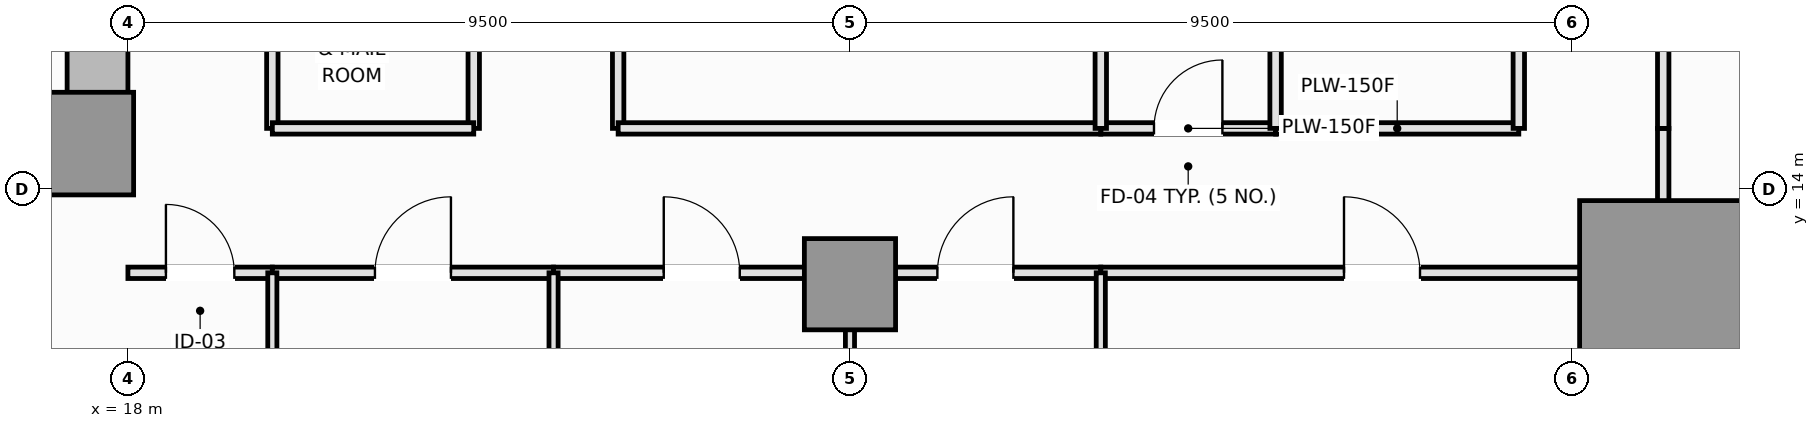
"""IFC4 building model, lengths in metres.
Left out: names, types, materials, properties, quantities, classifications, styles, units other than length and angle.
Written with IfcOpenShell. Run it as: python <this file> out.ifc"""

import sys

from ifc_helpers import new_model, si_unit, direction, frame, frame_2d, origin, origin_2d, place, context, subcontext, project, spatial, rectangle, extrude, element, fill, save


model = new_model("IFC4")
c1 = context("Model", 3, precision=1e-05, world=origin(), true_north=direction((0.0, 1.0)))
c2 = subcontext(c1, "Body", "Model", "MODEL_VIEW")
j1 = project(units=[si_unit("LENGTHUNIT", "METRE"), si_unit("PLANEANGLEUNIT", "RADIAN")], contexts=[c1])
p1 = place(None, origin())
s1 = spatial("IfcSite", under=j1, at=p1, CompositionType="ELEMENT")
p2 = place(p1, origin())
s2 = spatial("IfcBuilding", under=s1, at=p2, CompositionType="ELEMENT")
p3 = place(p2, frame((0.0, 0.0, 82.4)))
s3 = spatial("IfcBuildingStorey", under=s2, at=p3, CompositionType="ELEMENT", Elevation=82.4)
p4 = place(p3, frame((4.5, 14.4, 0.0), z_axis=(0.0, 0.0, 1.0), x_axis=(1.0, 0.0, 0.0)))
e1 = element("IfcWall", 1, at=p4, inside=s3, PredefinedType="SHEAR", context=c2, shape_type="SweptSolid", body=[
    extrude(rectangle(XDim=13.5, YDim=0.8, at=frame_2d((6.75, 0.0))), origin(), (0.0, 0.0, 1.0), 3.55),
])
p5 = place(p3, frame((17.6, 14.8, 0.0), z_axis=(0.0, 0.0, 1.0), x_axis=(0.0, 1.0, 0.0)))
e2 = element("IfcWall", 2, at=p5, inside=s3, PredefinedType="SHEAR", context=c2, shape_type="SweptSolid", body=[
    extrude(rectangle(XDim=8.65, YDim=0.8, at=frame_2d((4.325, 0.0))), origin(), (0.0, 0.0, 1.0), 3.55),
])
p6 = place(p5, frame((4.1, 0.0, 0.0)))
e3 = element("IfcOpeningElement", 3, at=p6, cuts=e2, PredefinedType="OPENING", context=c2, shape_type="SweptSolid", body=[
    extrude(rectangle(XDim=1.1, YDim=2.15, at=frame_2d((0.55, 1.075))), frame((0.0, 0.41, 0.0), z_axis=(0.0, -1.0, 0.0), x_axis=(1.0, 0.0, 0.0)), (0.0, 0.0, 1.0), 0.82),
])
p7 = place(p3, frame((17.4, 14.6, 0.0), z_axis=(0.0, 0.0, 1.0), x_axis=(1.0, 0.0, 0.0)))
e4 = element("IfcColumn", 4, at=p7, inside=s3, PredefinedType="PILASTER", context=c2, shape_type="SweptSolid", body=[
    extrude(rectangle(XDim=1.35, YDim=1.35, at=origin_2d()), origin(), (0.0, 0.0, 1.0), 3.55),
])
p8 = place(p3, frame((38.2, 12.75, 0.0), z_axis=(0.0, 0.0, 1.0), x_axis=(1.0, 0.0, 0.0)))
e5 = element("IfcColumn", 5, at=p8, inside=s3, PredefinedType="COLUMN", context=c2, shape_type="SweptSolid", body=[
    extrude(rectangle(XDim=2.2, YDim=2.2, at=origin_2d()), origin(), (0.0, 0.0, 1.0), 3.55),
])
p9 = place(p3, frame((27.5, 12.75, 0.0), z_axis=(0.0, 0.0, 1.0), x_axis=(1.0, 0.0, 0.0)))
e6 = element("IfcColumn", 6, at=p9, inside=s3, PredefinedType="COLUMN", context=c2, shape_type="SweptSolid", body=[
    extrude(rectangle(XDim=1.2, YDim=1.2, at=origin_2d()), origin(), (0.0, 0.0, 1.0), 3.55),
])
p10 = place(p3, frame((22.55, 14.8, 0.0), z_axis=(0.0, 0.0, 1.0), x_axis=(0.0, 1.0, 0.0)))
e7 = element("IfcWall", 7, at=p10, inside=s3, PredefinedType="PARTITIONING", context=c2, shape_type="SweptSolid", body=[
    extrude(rectangle(XDim=5.95, YDim=0.15, at=frame_2d((2.975, 0.0))), origin(), (0.0, 0.0, 1.0), 3.01),
])
p11 = place(p10, frame((2.475, 0.0, 0.0)))
e8 = element("IfcOpeningElement", 8, at=p11, cuts=e7, PredefinedType="OPENING", context=c2, shape_type="SweptSolid", body=[
    extrude(rectangle(XDim=1.0, YDim=2.15, at=frame_2d((0.5, 1.075))), frame((0.0, 0.085, 0.0), z_axis=(0.0, -1.0, 0.0), x_axis=(1.0, 0.0, 0.0)), (0.0, 0.0, 1.0), 0.17),
])
p12 = place(p3, frame((24.45, 14.8, 0.0), z_axis=(0.0, 0.0, 1.0), x_axis=(0.0, 1.0, 0.0)))
e9 = element("IfcWall", 9, at=p12, inside=s3, PredefinedType="PARTITIONING", context=c2, shape_type="SweptSolid", body=[
    extrude(rectangle(XDim=3.1, YDim=0.15, at=frame_2d((1.55, 0.0))), origin(), (0.0, 0.0, 1.0), 3.37),
])
p13 = place(p12, frame((1.05, 0.0, 0.0)))
e10 = element("IfcOpeningElement", 10, at=p13, cuts=e9, PredefinedType="OPENING", context=c2, shape_type="SweptSolid", body=[
    extrude(rectangle(XDim=1.0, YDim=2.15, at=frame_2d((0.5, 1.075))), frame((0.0, 0.085, 0.0), z_axis=(0.0, -1.0, 0.0), x_axis=(1.0, 0.0, 0.0)), (0.0, 0.0, 1.0), 0.17),
])
p14 = place(p3, frame((19.9, 14.8, 0.0), z_axis=(0.0, 0.0, 1.0), x_axis=(0.0, 1.0, 0.0)))
e11 = element("IfcWall", 11, at=p14, inside=s3, PredefinedType="PARTITIONING", context=c2, shape_type="SweptSolid", body=[
    extrude(rectangle(XDim=5.95, YDim=0.15, at=frame_2d((2.975, 0.0))), origin(), (0.0, 0.0, 1.0), 3.37),
])
p15 = place(p3, frame((19.9, 14.8, 0.0), z_axis=(0.0, 0.0, 1.0), x_axis=(1.0, 0.0, 0.0)))
e12 = element("IfcWall", 12, at=p15, inside=s3, PredefinedType="PARTITIONING", context=c2, shape_type="SweptSolid", body=[
    extrude(rectangle(XDim=2.65, YDim=0.15, at=frame_2d((1.325, 0.0))), origin(), (0.0, 0.0, 1.0), 3.37),
])
p16 = place(p3, frame((33.1, 14.8, 0.0), z_axis=(0.0, 0.0, 1.0), x_axis=(1.0, 0.0, 0.0)))
e13 = element("IfcWall", 13, at=p16, inside=s3, PredefinedType="PLUMBINGWALL", context=c2, shape_type="SweptSolid", body=[
    extrude(rectangle(XDim=3.2, YDim=0.15, at=frame_2d((1.6, 0.0))), origin(), (0.0, 0.0, 1.0), 3.37),
])
p17 = place(p3, frame((30.8, 14.8, 0.0), z_axis=(0.0, 0.0, 1.0), x_axis=(1.0, 0.0, 0.0)))
e14 = element("IfcWall", 14, at=p17, inside=s3, PredefinedType="PLUMBINGWALL", context=c2, shape_type="SweptSolid", body=[
    extrude(rectangle(XDim=2.3, YDim=0.15, at=frame_2d((1.15, 0.0))), origin(), (0.0, 0.0, 1.0), 3.37),
])
p18 = place(p17, frame((0.7, 0.0, 0.0)))
e15 = element("IfcOpeningElement", 15, at=p18, cuts=e14, PredefinedType="OPENING", context=c2, shape_type="SweptSolid", body=[
    extrude(rectangle(XDim=0.9, YDim=2.1, at=frame_2d((0.45, 1.05))), frame((0.0, 0.085, 0.0), z_axis=(0.0, -1.0, 0.0), x_axis=(1.0, 0.0, 0.0)), (0.0, 0.0, 1.0), 0.17),
])
p19 = place(p3, frame((24.45, 14.8, 0.0), z_axis=(0.0, 0.0, 1.0), x_axis=(1.0, 0.0, 0.0)))
e16 = element("IfcWall", 16, at=p19, inside=s3, PredefinedType="PARTITIONING", context=c2, shape_type="SweptSolid", body=[
    extrude(rectangle(XDim=6.35, YDim=0.15, at=frame_2d((3.175, 0.0))), origin(), (0.0, 0.0, 1.0), 3.37),
])
p20 = place(p3, frame((18.0, 12.9, 0.0), z_axis=(0.0, 0.0, 1.0), x_axis=(1.0, 0.0, 0.0)))
e17 = element("IfcWall", 17, at=p20, inside=s3, PredefinedType="PARTITIONING", context=c2, shape_type="SweptSolid", body=[
    extrude(rectangle(XDim=1.9, YDim=0.15, at=frame_2d((0.95, 0.0))), origin(), (0.0, 0.0, 1.0), 2.72),
])
p21 = place(p20, frame((0.5, 0.0, 0.0)))
e18 = element("IfcOpeningElement", 18, at=p21, cuts=e17, PredefinedType="OPENING", context=c2, shape_type="SweptSolid", body=[
    extrude(rectangle(XDim=0.9, YDim=2.1, at=frame_2d((0.45, 1.05))), frame((0.0, 0.085, 0.0), z_axis=(0.0, -1.0, 0.0), x_axis=(1.0, 0.0, 0.0)), (0.0, 0.0, 1.0), 0.17),
])
p22 = place(p3, frame((19.9, 12.9, 0.0), z_axis=(0.0, 0.0, 1.0), x_axis=(1.0, 0.0, 0.0)))
e19 = element("IfcWall", 19, at=p22, inside=s3, PredefinedType="PARTITIONING", context=c2, shape_type="SweptSolid", body=[
    extrude(rectangle(XDim=3.7, YDim=0.15, at=frame_2d((1.85, 0.0))), origin(), (0.0, 0.0, 1.0), 2.72),
])
p23 = place(p22, frame((1.35, 0.0, 0.0)))
e20 = element("IfcOpeningElement", 20, at=p23, cuts=e19, PredefinedType="OPENING", context=c2, shape_type="SweptSolid", body=[
    extrude(rectangle(XDim=1.0, YDim=2.15, at=frame_2d((0.5, 1.075))), frame((0.0, 0.085, 0.0), z_axis=(0.0, -1.0, 0.0), x_axis=(1.0, 0.0, 0.0)), (0.0, 0.0, 1.0), 0.17),
])
p24 = place(p3, frame((23.6, 12.9, 0.0), z_axis=(0.0, 0.0, 1.0), x_axis=(1.0, 0.0, 0.0)))
e21 = element("IfcWall", 21, at=p24, inside=s3, PredefinedType="PARTITIONING", context=c2, shape_type="SweptSolid", body=[
    extrude(rectangle(XDim=3.9, YDim=0.15, at=frame_2d((1.95, 0.0))), origin(), (0.0, 0.0, 1.0), 2.72),
])
p25 = place(p24, frame((1.45, 0.0, 0.0)))
e22 = element("IfcOpeningElement", 22, at=p25, cuts=e21, PredefinedType="OPENING", context=c2, shape_type="SweptSolid", body=[
    extrude(rectangle(XDim=1.0, YDim=2.15, at=frame_2d((0.5, 1.075))), frame((0.0, 0.085, 0.0), z_axis=(0.0, -1.0, 0.0), x_axis=(1.0, 0.0, 0.0)), (0.0, 0.0, 1.0), 0.17),
])
p26 = place(p3, frame((27.5, 12.9, 0.0), z_axis=(0.0, 0.0, 1.0), x_axis=(1.0, 0.0, 0.0)))
e23 = element("IfcWall", 23, at=p26, inside=s3, PredefinedType="PARTITIONING", context=c2, shape_type="SweptSolid", body=[
    extrude(rectangle(XDim=3.3, YDim=0.15, at=frame_2d((1.65, 0.0))), origin(), (0.0, 0.0, 1.0), 2.72),
])
p27 = place(p26, frame((1.15, 0.0, 0.0)))
e24 = element("IfcOpeningElement", 24, at=p27, cuts=e23, PredefinedType="OPENING", context=c2, shape_type="SweptSolid", body=[
    extrude(rectangle(XDim=1.0, YDim=2.15, at=frame_2d((0.5, 1.075))), frame((0.0, 0.085, 0.0), z_axis=(0.0, -1.0, 0.0), x_axis=(1.0, 0.0, 0.0)), (0.0, 0.0, 1.0), 0.17),
])
p28 = place(p3, frame((30.8, 12.9, 0.0), z_axis=(0.0, 0.0, 1.0), x_axis=(1.0, 0.0, 0.0)))
e25 = element("IfcWall", 25, at=p28, inside=s3, PredefinedType="PARTITIONING", context=c2, shape_type="SweptSolid", body=[
    extrude(rectangle(XDim=7.4, YDim=0.15, at=frame_2d((3.7, 0.0))), origin(), (0.0, 0.0, 1.0), 2.72),
])
p29 = place(p28, frame((3.2, 0.0, 0.0)))
e26 = element("IfcOpeningElement", 26, at=p29, cuts=e25, PredefinedType="OPENING", context=c2, shape_type="SweptSolid", body=[
    extrude(rectangle(XDim=1.0, YDim=2.15, at=frame_2d((0.5, 1.075))), frame((0.0, 0.085, 0.0), z_axis=(0.0, -1.0, 0.0), x_axis=(1.0, 0.0, 0.0)), (0.0, 0.0, 1.0), 0.17),
])
p30 = place(p3, frame((38.2, 12.9, 0.0), z_axis=(0.0, 0.0, 1.0), x_axis=(0.0, 1.0, 0.0)))
e27 = element("IfcWall", 27, at=p30, inside=s3, PredefinedType="PARTITIONING", context=c2, shape_type="SweptSolid", body=[
    extrude(rectangle(XDim=1.9, YDim=0.15, at=frame_2d((0.95, 0.0))), origin(), (0.0, 0.0, 1.0), 2.82),
])
p31 = place(p3, frame((36.3, 14.8, 0.0), z_axis=(0.0, 0.0, 1.0), x_axis=(0.0, 1.0, 0.0)))
e28 = element("IfcWall", 28, at=p31, inside=s3, PredefinedType="PLUMBINGWALL", context=c2, shape_type="SweptSolid", body=[
    extrude(rectangle(XDim=3.1, YDim=0.15, at=frame_2d((1.55, 0.0))), origin(), (0.0, 0.0, 1.0), 3.37),
])
p32 = place(p31, frame((1.1, 0.0, 0.0)))
e29 = element("IfcOpeningElement", 29, at=p32, cuts=e28, PredefinedType="OPENING", context=c2, shape_type="SweptSolid", body=[
    extrude(rectangle(XDim=0.9, YDim=2.1, at=frame_2d((0.45, 1.05))), frame((0.0, 0.085, 0.0), z_axis=(0.0, -1.0, 0.0), x_axis=(1.0, 0.0, 0.0)), (0.0, 0.0, 1.0), 0.17),
])
p33 = place(p3, frame((38.2, 14.8, 0.0), z_axis=(0.0, 0.0, 1.0), x_axis=(0.0, 1.0, 0.0)))
e30 = element("IfcWall", 30, at=p33, inside=s3, PredefinedType="PARTITIONING", context=c2, shape_type="SweptSolid", body=[
    extrude(rectangle(XDim=3.7, YDim=0.15, at=frame_2d((1.85, 0.0))), origin(), (0.0, 0.0, 1.0), 2.82),
])
p34 = place(p33, frame((1.35, 0.0, 0.0)))
e31 = element("IfcOpeningElement", 31, at=p34, cuts=e30, PredefinedType="OPENING", context=c2, shape_type="SweptSolid", body=[
    extrude(rectangle(XDim=1.0, YDim=2.15, at=frame_2d((0.5, 1.075))), frame((0.0, 0.085, 0.0), z_axis=(0.0, -1.0, 0.0), x_axis=(1.0, 0.0, 0.0)), (0.0, 0.0, 1.0), 0.17),
])
for number, where, z_axis, x_axis in (
    (32, (33.1, 14.8, 0.0), (0.0, 0.0, 1.0), (0.0, 1.0, 0.0)),
    (33, (30.8, 14.8, 0.0), (0.0, 0.0, 1.0), (0.0, 1.0, 0.0)),
):
    element("IfcWall", number, at=place(p3, frame(where, z_axis=z_axis, x_axis=x_axis)), inside=s3, PredefinedType="PLUMBINGWALL", context=c2, shape_type="SweptSolid", body=[
        extrude(rectangle(XDim=3.1, YDim=0.15, at=frame_2d((1.55, 0.0))), origin(), (0.0, 0.0, 1.0), 3.37),
    ])
for number, where, z_axis, x_axis in (
    (34, (19.9, 2.51, 0.0), (0.0, 0.0, 1.0), (0.0, 1.0, 0.0)),
    (35, (23.6, 2.51, 0.0), (0.0, 0.0, 1.0), (0.0, 1.0, 0.0)),
):
    element("IfcWall", number, at=place(p3, frame(where, z_axis=z_axis, x_axis=x_axis)), inside=s3, PredefinedType="PARTITIONING", context=c2, shape_type="SweptSolid", body=[
        extrude(rectangle(XDim=10.39, YDim=0.12, at=frame_2d((5.195, 0.0))), origin(), (0.0, 0.0, 1.0), 3.37),
    ])
p35 = place(p3, frame((27.5, 2.51, 0.0), z_axis=(0.0, 0.0, 1.0), x_axis=(0.0, 1.0, 0.0)))
e36 = element("IfcWall", 36, at=p35, inside=s3, PredefinedType="PARTITIONING", context=c2, shape_type="SweptSolid", body=[
    extrude(rectangle(XDim=10.39, YDim=0.12, at=frame_2d((5.195, 0.0))), origin(), (0.0, 0.0, 1.0), 2.82),
])
p36 = place(p3, frame((30.8, 2.51, 0.0), z_axis=(0.0, 0.0, 1.0), x_axis=(0.0, 1.0, 0.0)))
e37 = element("IfcWall", 37, at=p36, inside=s3, PredefinedType="PARTITIONING", context=c2, shape_type="SweptSolid", body=[
    extrude(rectangle(XDim=10.39, YDim=0.12, at=frame_2d((5.195, 0.0))), origin(), (0.0, 0.0, 1.0), 3.01),
])
p37 = place(p3, frame((38.2, 2.51, 0.0), z_axis=(0.0, 0.0, 1.0), x_axis=(0.0, 1.0, 0.0)))
e38 = element("IfcWall", 38, at=p37, inside=s3, PredefinedType="PARTITIONING", context=c2, shape_type="SweptSolid", body=[
    extrude(rectangle(XDim=10.39, YDim=0.12, at=frame_2d((5.195, 0.0))), origin(), (0.0, 0.0, 1.0), 2.82),
])
p38 = place(p18, origin())
e39 = element("IfcDoor", 39, at=p38, inside=s3, OperationType="SINGLE_SWING_RIGHT", PredefinedType="DOOR", context=c2, shape_type="SweptSolid", body=[
    extrude(rectangle(XDim=0.9, YDim=2.1, at=frame_2d((0.45, 1.05))), frame((0.0, 0.025, 0.0), z_axis=(0.0, -1.0, 0.0), x_axis=(1.0, 0.0, 0.0)), (0.0, 0.0, 1.0), 0.05),
])
fill(e15, e39)
p39 = place(p21, origin())
e40 = element("IfcDoor", 40, at=p39, inside=s3, OperationType="SINGLE_SWING_LEFT", PredefinedType="DOOR", context=c2, shape_type="SweptSolid", body=[
    extrude(rectangle(XDim=0.9, YDim=2.1, at=frame_2d((0.45, 1.05))), frame((0.0, 0.025, 0.0), z_axis=(0.0, -1.0, 0.0), x_axis=(1.0, 0.0, 0.0)), (0.0, 0.0, 1.0), 0.05),
])
fill(e18, e40)
p40 = place(p23, origin())
e41 = element("IfcDoor", 41, at=p40, inside=s3, OperationType="SINGLE_SWING_RIGHT", PredefinedType="DOOR", context=c2, shape_type="SweptSolid", body=[
    extrude(rectangle(XDim=1.0, YDim=2.15, at=frame_2d((0.5, 1.075))), frame((0.0, 0.025, 0.0), z_axis=(0.0, -1.0, 0.0), x_axis=(1.0, 0.0, 0.0)), (0.0, 0.0, 1.0), 0.05),
])
fill(e20, e41)
p41 = place(p25, origin())
e42 = element("IfcDoor", 42, at=p41, inside=s3, OperationType="SINGLE_SWING_LEFT", PredefinedType="DOOR", context=c2, shape_type="SweptSolid", body=[
    extrude(rectangle(XDim=1.0, YDim=2.15, at=frame_2d((0.5, 1.075))), frame((0.0, 0.025, 0.0), z_axis=(0.0, -1.0, 0.0), x_axis=(1.0, 0.0, 0.0)), (0.0, 0.0, 1.0), 0.05),
])
fill(e22, e42)
p42 = place(p27, origin())
e43 = element("IfcDoor", 43, at=p42, inside=s3, OperationType="SINGLE_SWING_RIGHT", PredefinedType="DOOR", context=c2, shape_type="SweptSolid", body=[
    extrude(rectangle(XDim=1.0, YDim=2.15, at=frame_2d((0.5, 1.075))), frame((0.0, 0.025, 0.0), z_axis=(0.0, -1.0, 0.0), x_axis=(1.0, 0.0, 0.0)), (0.0, 0.0, 1.0), 0.05),
])
fill(e24, e43)
p43 = place(p29, origin())
e44 = element("IfcDoor", 44, at=p43, inside=s3, OperationType="SINGLE_SWING_LEFT", PredefinedType="DOOR", context=c2, shape_type="SweptSolid", body=[
    extrude(rectangle(XDim=1.0, YDim=2.15, at=frame_2d((0.5, 1.075))), frame((0.0, 0.025, 0.0), z_axis=(0.0, -1.0, 0.0), x_axis=(1.0, 0.0, 0.0)), (0.0, 0.0, 1.0), 0.05),
])
fill(e26, e44)
save(model, sys.argv[1])
